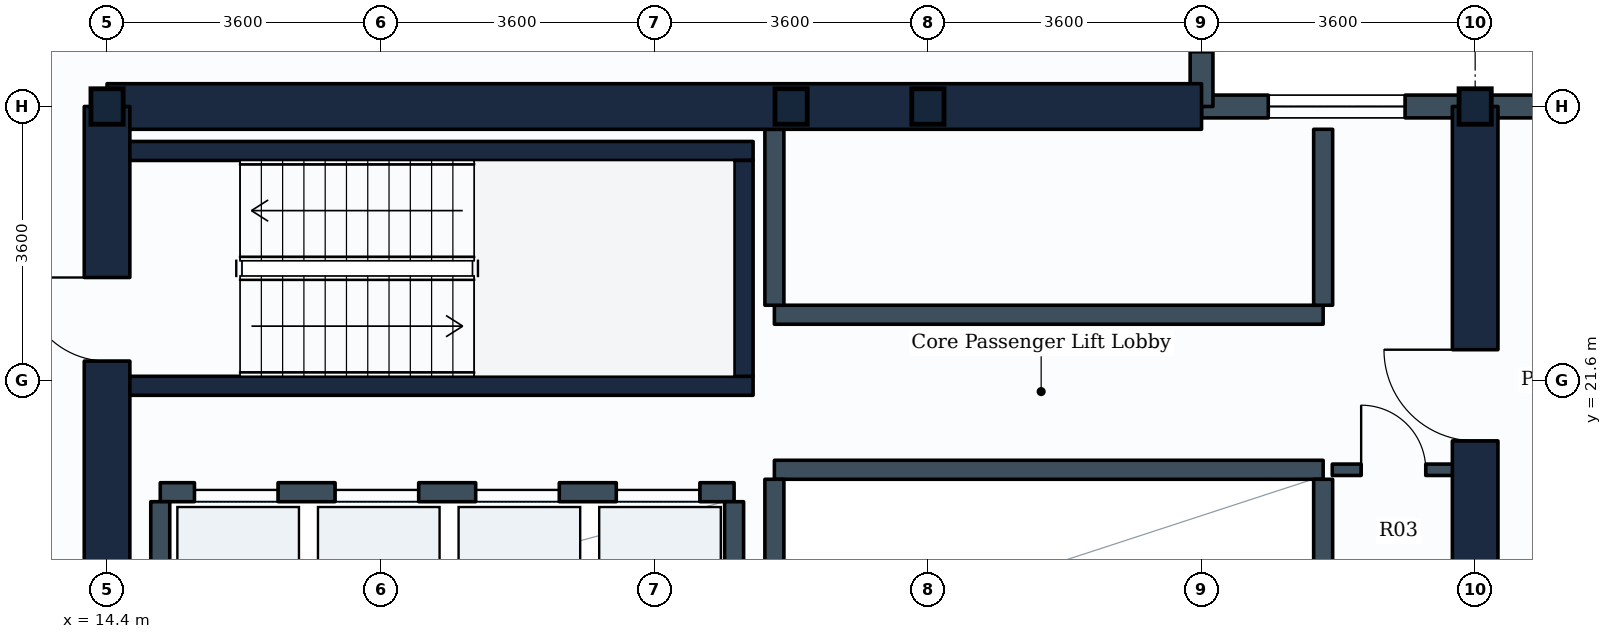
"""IFC4 building model, lengths in metres.
Left out: names, types, materials, properties, quantities, classifications, styles, units other than length and angle.
Written with IfcOpenShell. Run it as: python <this file> out.ifc"""

import sys

from ifc_helpers import new_model, si_unit, direction, frame, frame_2d, origin, origin_2d, place, context, subcontext, project, spatial, rectangle, i_section, extrude, element, fill, save


model = new_model("IFC4")
c1 = context("Model", 3, precision=1e-05, world=origin(), true_north=direction((0.0, 1.0)))
c2 = subcontext(c1, "Body", "Model", "MODEL_VIEW")
j1 = project(units=[si_unit("LENGTHUNIT", "METRE"), si_unit("PLANEANGLEUNIT", "RADIAN")], contexts=[c1])
p1 = place(None, origin())
s1 = spatial("IfcSite", under=j1, at=p1, CompositionType="ELEMENT")
p2 = place(p1, origin())
s2 = spatial("IfcBuilding", under=s1, at=p2, CompositionType="ELEMENT")
p3 = place(p2, frame((0.0, 0.0, 111.3)))
s3 = spatial("IfcBuildingStorey", under=s2, at=p3, CompositionType="ELEMENT", Elevation=111.3)
for number, where, z_axis, x_axis in (
    (1, (14.4, 25.2, 0.0), (0.0, 0.0, 1.0), (1.0, 0.0, 0.0)),
    (2, (23.4, 25.2, 0.0), (0.0, 0.0, 1.0), (1.0, 0.0, 0.0)),
    (3, (25.2, 25.2, 0.0), (0.0, 0.0, 1.0), (1.0, 0.0, 0.0)),
    (4, (32.4, 25.2, 0.0), (0.0, 0.0, 1.0), (1.0, 0.0, 0.0)),
):
    element("IfcColumn", number, at=place(p3, frame(where, z_axis=z_axis, x_axis=x_axis)), inside=s3, PredefinedType="COLUMN", context=c2, shape_type="SweptSolid", body=[
        extrude(i_section(OverallWidth=0.424, OverallDepth=0.467, WebThickness=0.033, FlangeThickness=0.053, FilletRadius=0.015, at=origin_2d()), origin(), (0.0, 0.0, 1.0), 3.9),
    ])
p4 = place(p3, frame((32.4, 25.2, 0.0), z_axis=(0.0, 0.0, 1.0), x_axis=(1.0, 0.0, 0.0)))
e5 = element("IfcWall", 5, at=p4, inside=s3, PredefinedType="STANDARD", context=c2, shape_type="SweptSolid", body=[
    extrude(rectangle(XDim=3.6, YDim=0.3, at=frame_2d((1.8, 0.0))), origin(), (0.0, 0.0, 1.0), 3.03),
])
p5 = place(p3, frame((28.8, 25.2, 0.0), z_axis=(0.0, 0.0, 1.0), x_axis=(1.0, 0.0, 0.0)))
e6 = element("IfcWall", 6, at=p5, inside=s3, PredefinedType="STANDARD", context=c2, shape_type="SweptSolid", body=[
    extrude(rectangle(XDim=3.6, YDim=0.3, at=frame_2d((1.8, 0.0))), origin(), (0.0, 0.0, 1.0), 3.565),
])
p6 = place(p5, frame((0.878, 0.0, 0.85)))
e7 = element("IfcOpeningElement", 7, at=p6, cuts=e6, PredefinedType="OPENING", context=c2, shape_type="SweptSolid", body=[
    extrude(rectangle(XDim=1.8, YDim=1.35, at=frame_2d((0.9, 0.675))), frame((0.0, 0.16, 0.0), z_axis=(0.0, -1.0, 0.0), x_axis=(1.0, 0.0, 0.0)), (0.0, 0.0, 1.0), 0.32),
])
p7 = place(p3, frame((28.8, 25.2, 0.0), z_axis=(0.0, 0.0, 1.0), x_axis=(0.0, 1.0, 0.0)))
e8 = element("IfcWall", 8, at=p7, inside=s3, PredefinedType="STANDARD", context=c2, shape_type="SweptSolid", body=[
    extrude(rectangle(XDim=3.6, YDim=0.3, at=frame_2d((1.8, 0.0))), origin(), (0.0, 0.0, 1.0), 3.12),
])
p8 = place(p7, frame((0.72, 0.0, 0.85)))
e9 = element("IfcOpeningElement", 9, at=p8, cuts=e8, PredefinedType="OPENING", context=c2, shape_type="SweptSolid", body=[
    extrude(rectangle(XDim=1.8, YDim=1.35, at=frame_2d((0.9, 0.675))), frame((0.0, 0.16, 0.0), z_axis=(0.0, -1.0, 0.0), x_axis=(1.0, 0.0, 0.0)), (0.0, 0.0, 1.0), 0.32),
])
p9 = place(p3, frame((14.4, 25.2, 0.0), z_axis=(0.0, 0.0, 1.0), x_axis=(1.0, 0.0, 0.0)))
e10 = element("IfcWall", 10, at=p9, inside=s3, PredefinedType="SHEAR", context=c2, shape_type="SweptSolid", body=[
    extrude(rectangle(XDim=14.4, YDim=0.6, at=frame_2d((7.2, 0.0))), origin(), (0.0, 0.0, 1.0), 3.58),
])
p10 = place(p3, frame((14.4, 10.8, 0.0), z_axis=(0.0, 0.0, 1.0), x_axis=(0.0, 1.0, 0.0)))
e11 = element("IfcWall", 11, at=p10, inside=s3, PredefinedType="SHEAR", context=c2, shape_type="SweptSolid", body=[
    extrude(rectangle(XDim=14.4, YDim=0.6, at=frame_2d((7.2, 0.0))), origin(), (0.0, 0.0, 1.0), 3.58),
])
p11 = place(p10, frame((11.05, 0.0, 0.0)))
e12 = element("IfcOpeningElement", 12, at=p11, cuts=e11, PredefinedType="OPENING", context=c2, shape_type="SweptSolid", body=[
    extrude(rectangle(XDim=1.1, YDim=2.1, at=frame_2d((0.55, 1.05))), frame((0.0, 0.31, 0.0), z_axis=(0.0, -1.0, 0.0), x_axis=(1.0, 0.0, 0.0)), (0.0, 0.0, 1.0), 0.62),
])
p12 = place(p10, frame((4.9, 0.0, 0.0)))
e13 = element("IfcOpeningElement", 13, at=p12, cuts=e11, PredefinedType="OPENING", context=c2, shape_type="SweptSolid", body=[
    extrude(rectangle(XDim=1.2, YDim=2.1, at=frame_2d((0.6, 1.05))), frame((0.0, 0.31, 0.0), z_axis=(0.0, -1.0, 0.0), x_axis=(1.0, 0.0, 0.0)), (0.0, 0.0, 1.0), 0.62),
])
p13 = place(p3, frame((32.4, 10.8, 0.0), z_axis=(0.0, 0.0, 1.0), x_axis=(0.0, 1.0, 0.0)))
e14 = element("IfcWall", 14, at=p13, inside=s3, PredefinedType="SHEAR", context=c2, shape_type="SweptSolid", body=[
    extrude(rectangle(XDim=14.4, YDim=0.6, at=frame_2d((7.2, 0.0))), origin(), (0.0, 0.0, 1.0), 3.58),
])
p14 = place(p13, frame((4.35, 0.0, 0.0)))
e15 = element("IfcOpeningElement", 15, at=p14, cuts=e14, PredefinedType="OPENING", context=c2, shape_type="SweptSolid", body=[
    extrude(rectangle(XDim=1.2, YDim=2.1, at=frame_2d((0.6, 1.05))), frame((0.0, 0.31, 0.0), z_axis=(0.0, -1.0, 0.0), x_axis=(1.0, 0.0, 0.0)), (0.0, 0.0, 1.0), 0.62),
])
p15 = place(p13, frame((10.0, 0.0, 0.0)))
e16 = element("IfcOpeningElement", 16, at=p15, cuts=e14, PredefinedType="OPENING", context=c2, shape_type="SweptSolid", body=[
    extrude(rectangle(XDim=1.2, YDim=2.1, at=frame_2d((0.6, 1.05))), frame((0.0, 0.31, 0.0), z_axis=(0.0, -1.0, 0.0), x_axis=(1.0, 0.0, 0.0)), (0.0, 0.0, 1.0), 0.62),
])
for number, where, z_axis, x_axis in (
    (17, (14.7, 21.525, 0.0), (0.0, 0.0, 1.0), (1.0, 0.0, 0.0)),
    (18, (14.7, 24.615, 0.0), (0.0, 0.0, 1.0), (1.0, 0.0, 0.0)),
):
    element("IfcWall", number, at=place(p3, frame(where, z_axis=z_axis, x_axis=x_axis)), inside=s3, PredefinedType="SHEAR", context=c2, shape_type="SweptSolid", body=[
        extrude(rectangle(XDim=8.2, YDim=0.25, at=frame_2d((4.1, 0.0))), origin(), (0.0, 0.0, 1.0), 3.58),
    ])
p16 = place(p3, frame((22.775, 21.65, 0.0), z_axis=(0.0, 0.0, 1.0), x_axis=(0.0, 1.0, 0.0)))
e19 = element("IfcWall", 19, at=p16, inside=s3, PredefinedType="SHEAR", context=c2, shape_type="SweptSolid", body=[
    extrude(rectangle(XDim=2.84, YDim=0.25, at=frame_2d((1.42, 0.0))), origin(), (0.0, 0.0, 1.0), 3.58),
])
p17 = place(p3, frame((15.1, 20.125, 0.0), z_axis=(0.0, 0.0, 1.0), x_axis=(1.0, 0.0, 0.0)))
e20 = element("IfcWall", 20, at=p17, inside=s3, PredefinedType="PARTITIONING", context=c2, shape_type="SweptSolid", body=[
    extrude(rectangle(XDim=7.55, YDim=0.25, at=frame_2d((3.775, 0.0))), origin(), (0.0, 0.0, 1.0), 3.565),
])
p18 = place(p17, frame((0.45, 0.0, 0.0)))
e21 = element("IfcOpeningElement", 21, at=p18, cuts=e20, PredefinedType="OPENING", context=c2, shape_type="SweptSolid", body=[
    extrude(rectangle(XDim=1.1, YDim=2.1, at=frame_2d((0.55, 1.05))), frame((0.0, 0.135, 0.0), z_axis=(0.0, -1.0, 0.0), x_axis=(1.0, 0.0, 0.0)), (0.0, 0.0, 1.0), 0.27),
])
p19 = place(p17, frame((2.3, 0.0, 0.0)))
e22 = element("IfcOpeningElement", 22, at=p19, cuts=e20, PredefinedType="OPENING", context=c2, shape_type="SweptSolid", body=[
    extrude(rectangle(XDim=1.1, YDim=2.1, at=frame_2d((0.55, 1.05))), frame((0.0, 0.135, 0.0), z_axis=(0.0, -1.0, 0.0), x_axis=(1.0, 0.0, 0.0)), (0.0, 0.0, 1.0), 0.27),
])
p20 = place(p17, frame((4.15, 0.0, 0.0)))
e23 = element("IfcOpeningElement", 23, at=p20, cuts=e20, PredefinedType="OPENING", context=c2, shape_type="SweptSolid", body=[
    extrude(rectangle(XDim=1.1, YDim=2.1, at=frame_2d((0.55, 1.05))), frame((0.0, 0.135, 0.0), z_axis=(0.0, -1.0, 0.0), x_axis=(1.0, 0.0, 0.0)), (0.0, 0.0, 1.0), 0.27),
])
p21 = place(p17, frame((6.0, 0.0, 0.0)))
e24 = element("IfcOpeningElement", 24, at=p21, cuts=e20, PredefinedType="OPENING", context=c2, shape_type="SweptSolid", body=[
    extrude(rectangle(XDim=1.1, YDim=2.1, at=frame_2d((0.55, 1.05))), frame((0.0, 0.135, 0.0), z_axis=(0.0, -1.0, 0.0), x_axis=(1.0, 0.0, 0.0)), (0.0, 0.0, 1.0), 0.27),
])
for number, where, z_axis, x_axis in (
    (25, (15.1, 18.025, 0.0), (0.0, 0.0, 1.0), (0.0, 1.0, 0.0)),
    (26, (22.65, 18.025, 0.0), (0.0, 0.0, 1.0), (0.0, 1.0, 0.0)),
):
    element("IfcWall", number, at=place(p3, frame(where, z_axis=z_axis, x_axis=x_axis)), inside=s3, PredefinedType="PARTITIONING", context=c2, shape_type="SweptSolid", body=[
        extrude(rectangle(XDim=1.975, YDim=0.25, at=frame_2d((0.988, 0.0))), origin(), (0.0, 0.0, 1.0), 3.565),
    ])
p22 = place(p3, frame((23.18, 20.42, 0.0), z_axis=(0.0, 0.0, 1.0), x_axis=(1.0, 0.0, 0.0)))
e27 = element("IfcWall", 27, at=p22, inside=s3, PredefinedType="PARTITIONING", context=c2, shape_type="SweptSolid", body=[
    extrude(rectangle(XDim=7.22, YDim=0.25, at=frame_2d((3.61, 0.0))), origin(), (0.0, 0.0, 1.0), 3.565),
])
for number, where, z_axis, x_axis in (
    (28, (23.18, 18.025, 0.0), (0.0, 0.0, 1.0), (0.0, 1.0, 0.0)),
    (29, (30.4, 18.025, 0.0), (0.0, 0.0, 1.0), (0.0, 1.0, 0.0)),
):
    element("IfcWall", number, at=place(p3, frame(where, z_axis=z_axis, x_axis=x_axis)), inside=s3, PredefinedType="PARTITIONING", context=c2, shape_type="SweptSolid", body=[
        extrude(rectangle(XDim=2.27, YDim=0.25, at=frame_2d((1.135, 0.0))), origin(), (0.0, 0.0, 1.0), 3.565),
    ])
p23 = place(p3, frame((23.18, 22.46, 0.0), z_axis=(0.0, 0.0, 1.0), x_axis=(1.0, 0.0, 0.0)))
e30 = element("IfcWall", 30, at=p23, inside=s3, PredefinedType="PARTITIONING", context=c2, shape_type="SweptSolid", body=[
    extrude(rectangle(XDim=7.22, YDim=0.25, at=frame_2d((3.61, 0.0))), origin(), (0.0, 0.0, 1.0), 3.565),
])
for number, where, z_axis, x_axis in (
    (31, (23.18, 22.585, 0.0), (0.0, 0.0, 1.0), (0.0, 1.0, 0.0)),
    (32, (30.4, 22.585, 0.0), (0.0, 0.0, 1.0), (0.0, 1.0, 0.0)),
):
    element("IfcWall", number, at=place(p3, frame(where, z_axis=z_axis, x_axis=x_axis)), inside=s3, PredefinedType="PARTITIONING", context=c2, shape_type="SweptSolid", body=[
        extrude(rectangle(XDim=2.315, YDim=0.25, at=frame_2d((1.157, 0.0))), origin(), (0.0, 0.0, 1.0), 3.565),
    ])
p24 = place(p3, frame((30.52, 20.42, 0.0), z_axis=(0.0, 0.0, 1.0), x_axis=(1.0, 0.0, 0.0)))
e33 = element("IfcWall", 33, at=p24, inside=s3, PredefinedType="PARTITIONING", context=c2, shape_type="SweptSolid", body=[
    extrude(rectangle(XDim=1.63, YDim=0.15, at=frame_2d((0.815, 0.0))), origin(), (0.0, 0.0, 1.0), 3.565),
])
p25 = place(p24, frame((0.38, 0.0, 0.0)))
e34 = element("IfcOpeningElement", 34, at=p25, cuts=e33, PredefinedType="OPENING", context=c2, shape_type="SweptSolid", body=[
    extrude(rectangle(XDim=0.85, YDim=2.1, at=frame_2d((0.425, 1.05))), frame((0.0, 0.085, 0.0), z_axis=(0.0, -1.0, 0.0), x_axis=(1.0, 0.0, 0.0)), (0.0, 0.0, 1.0), 0.17),
])
p26 = place(p6, origin())
e35 = element("IfcWindow", 35, at=p26, inside=s3, PartitioningType="SINGLE_PANEL", PredefinedType="WINDOW", context=c2, shape_type="SweptSolid", body=[
    extrude(rectangle(XDim=1.8, YDim=1.35, at=frame_2d((0.9, 0.675))), frame((0.0, 0.03, 0.0), z_axis=(0.0, -1.0, 0.0), x_axis=(1.0, 0.0, 0.0)), (0.0, 0.0, 1.0), 0.06),
])
fill(e7, e35)
p27 = place(p8, origin())
e36 = element("IfcWindow", 36, at=p27, inside=s3, PartitioningType="SINGLE_PANEL", PredefinedType="WINDOW", context=c2, shape_type="SweptSolid", body=[
    extrude(rectangle(XDim=1.8, YDim=1.35, at=frame_2d((0.9, 0.675))), frame((0.0, 0.03, 0.0), z_axis=(0.0, -1.0, 0.0), x_axis=(1.0, 0.0, 0.0)), (0.0, 0.0, 1.0), 0.06),
])
fill(e9, e36)
p28 = place(p11, origin())
e37 = element("IfcDoor", 37, at=p28, inside=s3, OperationType="SINGLE_SWING_RIGHT", PredefinedType="DOOR", context=c2, shape_type="SweptSolid", body=[
    extrude(rectangle(XDim=1.1, YDim=2.1, at=frame_2d((0.55, 1.05))), frame((0.0, 0.025, 0.0), z_axis=(0.0, -1.0, 0.0), x_axis=(1.0, 0.0, 0.0)), (0.0, 0.0, 1.0), 0.05),
])
fill(e12, e37)
p29 = place(p18, origin())
e38 = element("IfcDoor", 38, at=p29, inside=s3, OperationType="SLIDING_TO_LEFT", PredefinedType="DOOR", context=c2, shape_type="SweptSolid", body=[
    extrude(rectangle(XDim=1.1, YDim=2.1, at=frame_2d((0.55, 1.05))), frame((0.0, 0.025, 0.0), z_axis=(0.0, -1.0, 0.0), x_axis=(1.0, 0.0, 0.0)), (0.0, 0.0, 1.0), 0.05),
])
fill(e21, e38)
p30 = place(p19, origin())
e39 = element("IfcDoor", 39, at=p30, inside=s3, OperationType="SLIDING_TO_LEFT", PredefinedType="DOOR", context=c2, shape_type="SweptSolid", body=[
    extrude(rectangle(XDim=1.1, YDim=2.1, at=frame_2d((0.55, 1.05))), frame((0.0, 0.025, 0.0), z_axis=(0.0, -1.0, 0.0), x_axis=(1.0, 0.0, 0.0)), (0.0, 0.0, 1.0), 0.05),
])
fill(e22, e39)
p31 = place(p20, origin())
e40 = element("IfcDoor", 40, at=p31, inside=s3, OperationType="SLIDING_TO_LEFT", PredefinedType="DOOR", context=c2, shape_type="SweptSolid", body=[
    extrude(rectangle(XDim=1.1, YDim=2.1, at=frame_2d((0.55, 1.05))), frame((0.0, 0.025, 0.0), z_axis=(0.0, -1.0, 0.0), x_axis=(1.0, 0.0, 0.0)), (0.0, 0.0, 1.0), 0.05),
])
fill(e23, e40)
p32 = place(p21, origin())
e41 = element("IfcDoor", 41, at=p32, inside=s3, OperationType="SLIDING_TO_LEFT", PredefinedType="DOOR", context=c2, shape_type="SweptSolid", body=[
    extrude(rectangle(XDim=1.1, YDim=2.1, at=frame_2d((0.55, 1.05))), frame((0.0, 0.025, 0.0), z_axis=(0.0, -1.0, 0.0), x_axis=(1.0, 0.0, 0.0)), (0.0, 0.0, 1.0), 0.05),
])
fill(e24, e41)
p33 = place(p15, origin())
e42 = element("IfcDoor", 42, at=p33, inside=s3, OperationType="SINGLE_SWING_RIGHT", PredefinedType="DOOR", context=c2, shape_type="SweptSolid", body=[
    extrude(rectangle(XDim=1.2, YDim=2.1, at=frame_2d((0.6, 1.05))), frame((0.0, 0.025, 0.0), z_axis=(0.0, -1.0, 0.0), x_axis=(1.0, 0.0, 0.0)), (0.0, 0.0, 1.0), 0.05),
])
fill(e16, e42)
p34 = place(p25, origin())
e43 = element("IfcDoor", 43, at=p34, inside=s3, OperationType="SINGLE_SWING_LEFT", PredefinedType="DOOR", context=c2, shape_type="SweptSolid", body=[
    extrude(rectangle(XDim=0.85, YDim=2.1, at=frame_2d((0.425, 1.05))), frame((0.0, 0.025, 0.0), z_axis=(0.0, -1.0, 0.0), x_axis=(1.0, 0.0, 0.0)), (0.0, 0.0, 1.0), 0.05),
])
fill(e34, e43)
save(model, sys.argv[1])
